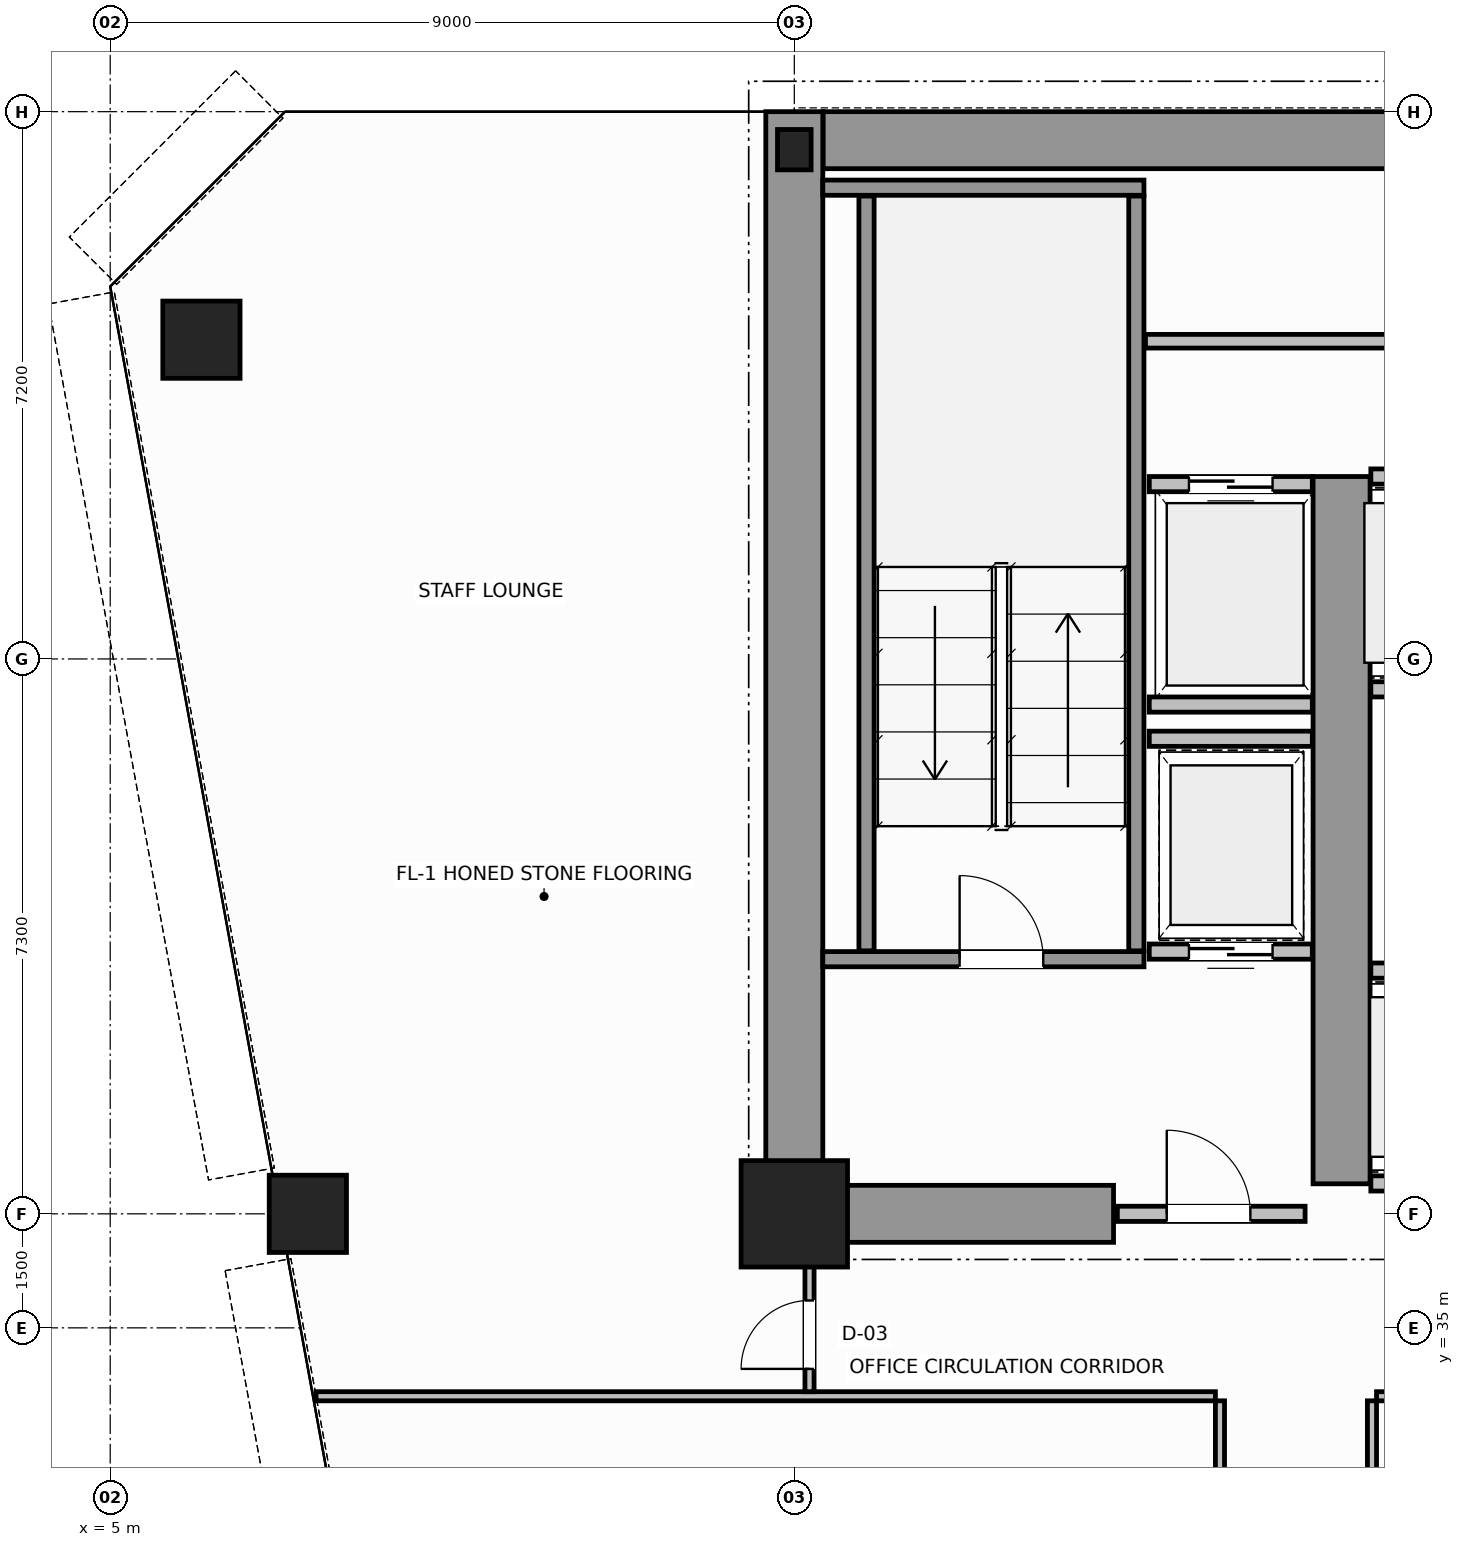
"""IFC4 building model, lengths in metres.
Left out: names, types, materials, properties, quantities, classifications, styles, units other than length and angle.
Written with IfcOpenShell. Run it as: python <this file> out.ifc"""

import sys

from ifc_helpers import new_model, si_unit, direction, frame, frame_2d, origin, origin_2d, place, context, subcontext, project, spatial, rectangle, hollow_circle, i_section, extrude, source, transform, mapped, element, fill, save


model = new_model("IFC4")
c1 = context("Model", 3, precision=1e-05, world=origin(), true_north=direction((0.0, 1.0)))
c2 = subcontext(c1, "Body", "Model", "MODEL_VIEW")
j1 = project(units=[si_unit("LENGTHUNIT", "METRE"), si_unit("PLANEANGLEUNIT", "RADIAN")], contexts=[c1])
p1 = place(None, origin())
s1 = spatial("IfcSite", under=j1, at=p1, CompositionType="ELEMENT")
p2 = place(p1, origin())
s2 = spatial("IfcBuilding", under=s1, at=p2, CompositionType="ELEMENT")
p3 = place(p2, frame((0.0, 0.0, 88.2)))
s3 = spatial("IfcBuildingStorey", under=s2, at=p3, CompositionType="ELEMENT", Elevation=88.2)
m1 = source(origin(), c2, "Body", "SweptSolid", [
    extrude(rectangle(XDim=1.4, YDim=1.4, at=origin_2d()), origin(), (0.0, 0.0, 1.0), 3.8),
])
p4 = place(p3, frame((14.0, 36.5, 0.0), z_axis=(0.0, 0.0, 1.0), x_axis=(1.0, 0.0, 0.0)))
e1 = element("IfcColumn", 1, at=p4, inside=s3, PredefinedType="COLUMN", context=c2, shape_type="MappedRepresentation", body=[
    mapped(m1, transform((0.0, 0.0, 0.0), scale=1.0)),
])
m2 = source(origin(), c2, "Body", "SweptSolid", [
    extrude(i_section(OverallWidth=0.442, OverallDepth=0.531, WebThickness=0.065, FlangeThickness=0.076, FilletRadius=0.015, at=origin_2d()), origin(), (0.0, 0.0, 1.0), 3.8),
])
p5 = place(p3, frame((14.0, 50.5, 0.0), z_axis=(0.0, 0.0, 1.0), x_axis=(1.0, 0.0, 0.0)))
e2 = element("IfcColumn", 2, at=p5, inside=s3, PredefinedType="COLUMN", context=c2, shape_type="MappedRepresentation", body=[
    mapped(m2, transform((0.0, 0.0, 0.0), scale=1.0)),
])
m3 = source(origin(), c2, "Body", "SweptSolid", [
    extrude(hollow_circle(Radius=0.508, WallThickness=0.045, at=origin_2d()), origin(), (0.0, 0.0, 1.0), 3.8),
])
for number, where, z_axis, x_axis in (
    (3, (6.2, 48.0, 0.0), (0.0, 0.0, 1.0), (1.0, 0.0, 0.0)),
    (4, (7.6, 36.5, 0.0), (0.0, 0.0, 1.0), (1.0, 0.0, 0.0)),
):
    element("IfcColumn", number, at=place(p3, frame(where, z_axis=z_axis, x_axis=x_axis)), inside=s3, PredefinedType="COLUMN", context=c2, shape_type="MappedRepresentation", body=[
        mapped(m3, transform((0.0, 0.0, 0.0), scale=1.0)),
    ])
p6 = place(p3, frame((14.379, 50.625, 0.0), z_axis=(0.0, 0.0, 1.0), x_axis=(1.0, 0.0, 0.0)))
e5 = element("IfcWall", 5, at=p6, inside=s3, PredefinedType="SHEAR", context=c2, shape_type="SweptSolid", body=[
    extrude(rectangle(XDim=19.619, YDim=0.75, at=frame_2d((9.81, 0.0))), origin(), (0.0, 0.0, 1.0), 3.8),
])
p7 = place(p3, frame((14.0, 36.5, 0.0), z_axis=(0.0, 0.0, 1.0), x_axis=(0.0, 1.0, 0.0)))
e6 = element("IfcWall", 6, at=p7, inside=s3, PredefinedType="SHEAR", context=c2, shape_type="SweptSolid", body=[
    extrude(rectangle(XDim=14.5, YDim=0.75, at=frame_2d((7.25, 0.0))), origin(), (0.0, 0.0, 1.0), 3.8),
])
p8 = place(p3, frame((14.395, 36.5, 0.0), z_axis=(0.0, 0.0, 1.0), x_axis=(1.0, 0.0, 0.0)))
e7 = element("IfcWall", 7, at=p8, inside=s3, PredefinedType="SHEAR", context=c2, shape_type="SweptSolid", body=[
    extrude(rectangle(XDim=3.805, YDim=0.75, at=frame_2d((1.902, 0.0))), origin(), (0.0, 0.0, 1.0), 2.38),
])
p9 = place(p3, frame((21.2, 36.895, 0.0), z_axis=(0.0, 0.0, 1.0), x_axis=(0.0, 1.0, 0.0)))
e8 = element("IfcWall", 8, at=p9, inside=s3, PredefinedType="SHEAR", context=c2, shape_type="SweptSolid", body=[
    extrude(rectangle(XDim=9.305, YDim=0.75, at=frame_2d((4.652, 0.0))), origin(), (0.0, 0.0, 1.0), 3.8),
])
p10 = place(p3, frame((14.375, 39.85, 0.0), z_axis=(0.0, 0.0, 1.0), x_axis=(1.0, 0.0, 0.0)))
e9 = element("IfcWall", 9, at=p10, inside=s3, PredefinedType="SOLIDWALL", context=c2, shape_type="SweptSolid", body=[
    extrude(rectangle(XDim=4.225, YDim=0.2, at=frame_2d((2.113, 0.0))), origin(), (0.0, 0.0, 1.0), 3.8),
])
p11 = place(p10, frame((1.8, 0.0, 0.0)))
e10 = element("IfcOpeningElement", 10, at=p11, cuts=e9, PredefinedType="OPENING", context=c2, shape_type="SweptSolid", body=[
    extrude(rectangle(XDim=1.1, YDim=2.15, at=frame_2d((0.55, 1.075))), frame((0.0, 0.11, 0.0), z_axis=(0.0, -1.0, 0.0), x_axis=(1.0, 0.0, 0.0)), (0.0, 0.0, 1.0), 0.22),
])
p12 = place(p3, frame((14.375, 50.0, 0.0), z_axis=(0.0, 0.0, 1.0), x_axis=(1.0, 0.0, 0.0)))
e11 = element("IfcWall", 11, at=p12, inside=s3, PredefinedType="SOLIDWALL", context=c2, shape_type="SweptSolid", body=[
    extrude(rectangle(XDim=4.225, YDim=0.2, at=frame_2d((2.113, 0.0))), origin(), (0.0, 0.0, 1.0), 3.8),
])
for number, where, z_axis, x_axis in (
    (12, (14.95, 39.96, 0.0), (0.0, 0.0, 1.0), (0.0, 1.0, 0.0)),
    (13, (18.5, 39.96, 0.0), (0.0, 0.0, 1.0), (0.0, 1.0, 0.0)),
):
    element("IfcWall", number, at=place(p3, frame(where, z_axis=z_axis, x_axis=x_axis)), inside=s3, PredefinedType="SOLIDWALL", context=c2, shape_type="SweptSolid", body=[
        extrude(rectangle(XDim=9.93, YDim=0.2, at=frame_2d((4.965, 0.0))), origin(), (0.0, 0.0, 1.0), 3.8),
    ])
p13 = place(p3, frame((18.25, 36.5, 0.0), z_axis=(0.0, 0.0, 1.0), x_axis=(1.0, 0.0, 0.0)))
e14 = element("IfcWall", 14, at=p13, inside=s3, PredefinedType="SOLIDWALL", context=c2, shape_type="SweptSolid", body=[
    extrude(rectangle(XDim=2.47, YDim=0.2, at=frame_2d((1.235, 0.0))), origin(), (0.0, 0.0, 1.0), 2.37),
])
p14 = place(p13, frame((0.65, 0.0, 0.0)))
e15 = element("IfcOpeningElement", 15, at=p14, cuts=e14, PredefinedType="OPENING", context=c2, shape_type="SweptSolid", body=[
    extrude(rectangle(XDim=1.1, YDim=2.15, at=frame_2d((0.55, 1.075))), frame((0.0, 0.11, 0.0), z_axis=(0.0, -1.0, 0.0), x_axis=(1.0, 0.0, 0.0)), (0.0, 0.0, 1.0), 0.22),
])
p15 = place(p3, frame((21.585, 39.7, 0.0), z_axis=(0.0, 0.0, 1.0), x_axis=(1.0, 0.0, 0.0)))
e16 = element("IfcWall", 16, at=p15, inside=s3, PredefinedType="SOLIDWALL", context=c2, shape_type="SweptSolid", body=[
    extrude(rectangle(XDim=1.845, YDim=0.2, at=frame_2d((0.922, 0.0))), origin(), (0.0, 0.0, 1.0), 3.58),
])
p16 = place(p15, frame((0.372, 0.0, 0.0)))
e17 = element("IfcOpeningElement", 17, at=p16, cuts=e16, PredefinedType="OPENING", context=c2, shape_type="SweptSolid", body=[
    extrude(rectangle(XDim=1.1, YDim=2.15, at=frame_2d((0.55, 1.075))), frame((0.0, 0.11, 0.0), z_axis=(0.0, -1.0, 0.0), x_axis=(1.0, 0.0, 0.0)), (0.0, 0.0, 1.0), 0.22),
])
p17 = place(p3, frame((21.585, 36.9, 0.0), z_axis=(0.0, 0.0, 1.0), x_axis=(1.0, 0.0, 0.0)))
e18 = element("IfcWall", 18, at=p17, inside=s3, PredefinedType="SOLIDWALL", context=c2, shape_type="SweptSolid", body=[
    extrude(rectangle(XDim=1.845, YDim=0.2, at=frame_2d((0.922, 0.0))), origin(), (0.0, 0.0, 1.0), 2.37),
])
p18 = place(p3, frame((21.585, 43.4, 0.0), z_axis=(0.0, 0.0, 1.0), x_axis=(1.0, 0.0, 0.0)))
e19 = element("IfcWall", 19, at=p18, inside=s3, PredefinedType="SOLIDWALL", context=c2, shape_type="SweptSolid", body=[
    extrude(rectangle(XDim=1.725, YDim=0.2, at=frame_2d((0.863, 0.0))), origin(), (0.0, 0.0, 1.0), 3.58),
])
p19 = place(p18, frame((0.312, 0.0, 0.0)))
e20 = element("IfcOpeningElement", 20, at=p19, cuts=e19, PredefinedType="OPENING", context=c2, shape_type="SweptSolid", body=[
    extrude(rectangle(XDim=1.1, YDim=2.15, at=frame_2d((0.55, 1.075))), frame((0.0, 0.11, 0.0), z_axis=(0.0, -1.0, 0.0), x_axis=(1.0, 0.0, 0.0)), (0.0, 0.0, 1.0), 0.22),
])
p20 = place(p3, frame((21.585, 46.2, 0.0), z_axis=(0.0, 0.0, 1.0), x_axis=(1.0, 0.0, 0.0)))
e21 = element("IfcWall", 21, at=p20, inside=s3, PredefinedType="SOLIDWALL", context=c2, shape_type="SweptSolid", body=[
    extrude(rectangle(XDim=1.725, YDim=0.2, at=frame_2d((0.863, 0.0))), origin(), (0.0, 0.0, 1.0), 3.58),
])
p21 = place(p3, frame((18.67, 46.1, 0.0), z_axis=(0.0, 0.0, 1.0), x_axis=(1.0, 0.0, 0.0)))
e22 = element("IfcWall", 22, at=p21, inside=s3, PredefinedType="SOLIDWALL", context=c2, shape_type="SweptSolid", body=[
    extrude(rectangle(XDim=2.145, YDim=0.2, at=frame_2d((1.073, 0.0))), origin(), (0.0, 0.0, 1.0), 3.58),
])
p22 = place(p21, frame((0.522, 0.0, 0.0)))
e23 = element("IfcOpeningElement", 23, at=p22, cuts=e22, PredefinedType="OPENING", context=c2, shape_type="SweptSolid", body=[
    extrude(rectangle(XDim=1.1, YDim=2.15, at=frame_2d((0.55, 1.075))), frame((0.0, 0.11, 0.0), z_axis=(0.0, -1.0, 0.0), x_axis=(1.0, 0.0, 0.0)), (0.0, 0.0, 1.0), 0.22),
])
p23 = place(p3, frame((18.67, 43.2, 0.0), z_axis=(0.0, 0.0, 1.0), x_axis=(1.0, 0.0, 0.0)))
e24 = element("IfcWall", 24, at=p23, inside=s3, PredefinedType="SOLIDWALL", context=c2, shape_type="SweptSolid", body=[
    extrude(rectangle(XDim=2.145, YDim=0.2, at=frame_2d((1.073, 0.0))), origin(), (0.0, 0.0, 1.0), 3.58),
])
p24 = place(p3, frame((18.67, 39.95, 0.0), z_axis=(0.0, 0.0, 1.0), x_axis=(1.0, 0.0, 0.0)))
e25 = element("IfcWall", 25, at=p24, inside=s3, PredefinedType="SOLIDWALL", context=c2, shape_type="SweptSolid", body=[
    extrude(rectangle(XDim=2.145, YDim=0.2, at=frame_2d((1.073, 0.0))), origin(), (0.0, 0.0, 1.0), 3.58),
])
p25 = place(p24, frame((0.522, 0.0, 0.0)))
e26 = element("IfcOpeningElement", 26, at=p25, cuts=e25, PredefinedType="OPENING", context=c2, shape_type="SweptSolid", body=[
    extrude(rectangle(XDim=1.1, YDim=2.15, at=frame_2d((0.55, 1.075))), frame((0.0, 0.11, 0.0), z_axis=(0.0, -1.0, 0.0), x_axis=(1.0, 0.0, 0.0)), (0.0, 0.0, 1.0), 0.22),
])
p26 = place(p3, frame((18.67, 42.75, 0.0), z_axis=(0.0, 0.0, 1.0), x_axis=(1.0, 0.0, 0.0)))
e27 = element("IfcWall", 27, at=p26, inside=s3, PredefinedType="SOLIDWALL", context=c2, shape_type="SweptSolid", body=[
    extrude(rectangle(XDim=2.145, YDim=0.2, at=frame_2d((1.073, 0.0))), origin(), (0.0, 0.0, 1.0), 3.58),
])
p27 = place(p3, frame((18.62, 47.98, 0.0), z_axis=(0.0, 0.0, 1.0), x_axis=(1.0, 0.0, 0.0)))
e28 = element("IfcWall", 28, at=p27, inside=s3, PredefinedType="PLUMBINGWALL", context=c2, shape_type="SweptSolid", body=[
    extrude(rectangle(XDim=20.06, YDim=0.18, at=frame_2d((10.03, 0.0))), origin(), (0.0, 0.0, 1.0), 3.58),
])
p28 = place(p27, frame((3.5, 0.0, 0.0)))
e29 = element("IfcOpeningElement", 29, at=p28, cuts=e28, PredefinedType="OPENING", context=c2, shape_type="SweptSolid", body=[
    extrude(rectangle(XDim=0.9, YDim=2.15, at=frame_2d((0.45, 1.075))), frame((0.0, 0.1, 0.0), z_axis=(0.0, -1.0, 0.0), x_axis=(1.0, 0.0, 0.0)), (0.0, 0.0, 1.0), 0.2),
])
p29 = place(p27, frame((10.8, 0.0, 0.0)))
e30 = element("IfcOpeningElement", 30, at=p29, cuts=e28, PredefinedType="OPENING", context=c2, shape_type="SweptSolid", body=[
    extrude(rectangle(XDim=0.9, YDim=2.15, at=frame_2d((0.45, 1.075))), frame((0.0, 0.1, 0.0), z_axis=(0.0, -1.0, 0.0), x_axis=(1.0, 0.0, 0.0)), (0.0, 0.0, 1.0), 0.2),
])
p30 = place(p27, frame((16.8, 0.0, 0.0)))
e31 = element("IfcOpeningElement", 31, at=p30, cuts=e28, PredefinedType="OPENING", context=c2, shape_type="SweptSolid", body=[
    extrude(rectangle(XDim=0.9, YDim=2.15, at=frame_2d((0.45, 1.075))), frame((0.0, 0.1, 0.0), z_axis=(0.0, -1.0, 0.0), x_axis=(1.0, 0.0, 0.0)), (0.0, 0.0, 1.0), 0.2),
])
p31 = place(p3, frame((21.66, 34.1, 0.0), z_axis=(0.0, 0.0, 1.0), x_axis=(1.0, 0.0, 0.0)))
e32 = element("IfcWall", 32, at=p31, inside=s3, PredefinedType="PARTITIONING", context=c2, shape_type="SweptSolid", body=[
    extrude(rectangle(XDim=24.68, YDim=0.12, at=frame_2d((12.34, 0.0))), origin(), (0.0, 0.0, 1.0), 3.58),
])
p32 = place(p31, frame((1.79, 0.0, 0.0)))
e33 = element("IfcOpeningElement", 33, at=p32, cuts=e32, PredefinedType="OPENING", context=c2, shape_type="SweptSolid", body=[
    extrude(rectangle(XDim=0.9, YDim=2.15, at=frame_2d((0.45, 1.075))), frame((0.0, 0.07, 0.0), z_axis=(0.0, -1.0, 0.0), x_axis=(1.0, 0.0, 0.0)), (0.0, 0.0, 1.0), 0.14),
])
p33 = place(p31, frame((14.19, 0.0, 0.0)))
e34 = element("IfcOpeningElement", 34, at=p33, cuts=e32, PredefinedType="OPENING", context=c2, shape_type="SweptSolid", body=[
    extrude(rectangle(XDim=0.9, YDim=2.15, at=frame_2d((0.45, 1.075))), frame((0.0, 0.07, 0.0), z_axis=(0.0, -1.0, 0.0), x_axis=(1.0, 0.0, 0.0)), (0.0, 0.0, 1.0), 0.14),
])
p34 = place(p3, frame((7.708, 34.1, 0.0), z_axis=(0.0, 0.0, 1.0), x_axis=(1.0, 0.0, 0.0)))
e35 = element("IfcWall", 35, at=p34, inside=s3, PredefinedType="PARTITIONING", context=c2, shape_type="SweptSolid", body=[
    extrude(rectangle(XDim=11.832, YDim=0.12, at=frame_2d((5.916, 0.0))), origin(), (0.0, 0.0, 1.0), 3.58),
])
p35 = place(p3, frame((14.2, 34.16, 0.0), z_axis=(0.0, 0.0, 1.0), x_axis=(0.0, 1.0, 0.0)))
e36 = element("IfcWall", 36, at=p35, inside=s3, PredefinedType="PARTITIONING", context=c2, shape_type="SweptSolid", body=[
    extrude(rectangle(XDim=2.28, YDim=0.12, at=frame_2d((1.14, 0.0))), origin(), (0.0, 0.0, 1.0), 3.58),
])
p36 = place(p35, frame((0.3, 0.0, 0.0)))
e37 = element("IfcOpeningElement", 37, at=p36, cuts=e36, PredefinedType="OPENING", context=c2, shape_type="SweptSolid", body=[
    extrude(rectangle(XDim=0.9, YDim=2.15, at=frame_2d((0.45, 1.075))), frame((0.0, 0.07, 0.0), z_axis=(0.0, -1.0, 0.0), x_axis=(1.0, 0.0, 0.0)), (0.0, 0.0, 1.0), 0.14),
])
p37 = place(p3, frame((19.6, 15.8, 0.0), z_axis=(0.0, 0.0, 1.0), x_axis=(0.0, 1.0, 0.0)))
e38 = element("IfcWall", 38, at=p37, inside=s3, PredefinedType="PARTITIONING", context=c2, shape_type="SweptSolid", body=[
    extrude(rectangle(XDim=18.24, YDim=0.12, at=frame_2d((9.12, 0.0))), origin(), (0.0, 0.0, 1.0), 3.58),
])
p38 = place(p37, frame((4.05, 0.0, 0.0)))
e39 = element("IfcOpeningElement", 39, at=p38, cuts=e38, PredefinedType="OPENING", context=c2, shape_type="SweptSolid", body=[
    extrude(rectangle(XDim=0.9, YDim=2.15, at=frame_2d((0.45, 1.075))), frame((0.0, 0.07, 0.0), z_axis=(0.0, -1.0, 0.0), x_axis=(1.0, 0.0, 0.0)), (0.0, 0.0, 1.0), 0.14),
])
p39 = place(p37, frame((13.17, 0.0, 0.0)))
e40 = element("IfcOpeningElement", 40, at=p39, cuts=e38, PredefinedType="OPENING", context=c2, shape_type="SweptSolid", body=[
    extrude(rectangle(XDim=0.9, YDim=2.15, at=frame_2d((0.45, 1.075))), frame((0.0, 0.07, 0.0), z_axis=(0.0, -1.0, 0.0), x_axis=(1.0, 0.0, 0.0)), (0.0, 0.0, 1.0), 0.14),
])
p40 = place(p3, frame((21.6, 15.8, 0.0), z_axis=(0.0, 0.0, 1.0), x_axis=(0.0, 1.0, 0.0)))
e41 = element("IfcWall", 41, at=p40, inside=s3, PredefinedType="PARTITIONING", context=c2, shape_type="SweptSolid", body=[
    extrude(rectangle(XDim=18.24, YDim=0.12, at=frame_2d((9.12, 0.0))), origin(), (0.0, 0.0, 1.0), 3.58),
])
m4 = source(origin(), c2, "Body", "SweptSolid", [
    extrude(rectangle(XDim=1.1, YDim=2.15, at=frame_2d((0.55, 1.075))), frame((0.0, 0.025, 0.0), z_axis=(0.0, -1.0, 0.0), x_axis=(1.0, 0.0, 0.0)), (0.0, 0.0, 1.0), 0.05),
])
p41 = place(p11, origin())
e42 = element("IfcDoor", 42, at=p41, inside=s3, OperationType="SINGLE_SWING_LEFT", PredefinedType="DOOR", context=c2, shape_type="MappedRepresentation", body=[
    mapped(m4, transform((0.0, 0.0, 0.0), scale=1.0)),
])
fill(e10, e42)
p42 = place(p14, origin())
e43 = element("IfcDoor", 43, at=p42, inside=s3, OperationType="SINGLE_SWING_RIGHT", PredefinedType="DOOR", context=c2, shape_type="MappedRepresentation", body=[
    mapped(m4, transform((0.0, 0.0, 0.0), scale=1.0)),
])
fill(e15, e43)
p43 = place(p22, origin())
e44 = element("IfcDoor", 44, at=p43, inside=s3, OperationType="DOUBLE_DOOR_SLIDING", PredefinedType="DOOR", context=c2, shape_type="MappedRepresentation", body=[
    mapped(m4, transform((0.0, 0.0, 0.0), scale=1.0)),
])
fill(e23, e44)
p44 = place(p25, origin())
e45 = element("IfcDoor", 45, at=p44, inside=s3, OperationType="DOUBLE_DOOR_SLIDING", PredefinedType="DOOR", context=c2, shape_type="MappedRepresentation", body=[
    mapped(m4, transform((0.0, 0.0, 0.0), scale=1.0)),
])
fill(e26, e45)
m5 = source(origin(), c2, "Body", "SweptSolid", [
    extrude(rectangle(XDim=0.9, YDim=2.15, at=frame_2d((0.45, 1.075))), frame((0.0, 0.025, 0.0), z_axis=(0.0, -1.0, 0.0), x_axis=(1.0, 0.0, 0.0)), (0.0, 0.0, 1.0), 0.05),
])
p45 = place(p36, origin())
e46 = element("IfcDoor", 46, at=p45, inside=s3, OperationType="SINGLE_SWING_LEFT", PredefinedType="DOOR", context=c2, shape_type="MappedRepresentation", body=[
    mapped(m5, transform((0.0, 0.0, 0.0), scale=1.0)),
])
fill(e37, e46)
save(model, sys.argv[1])
